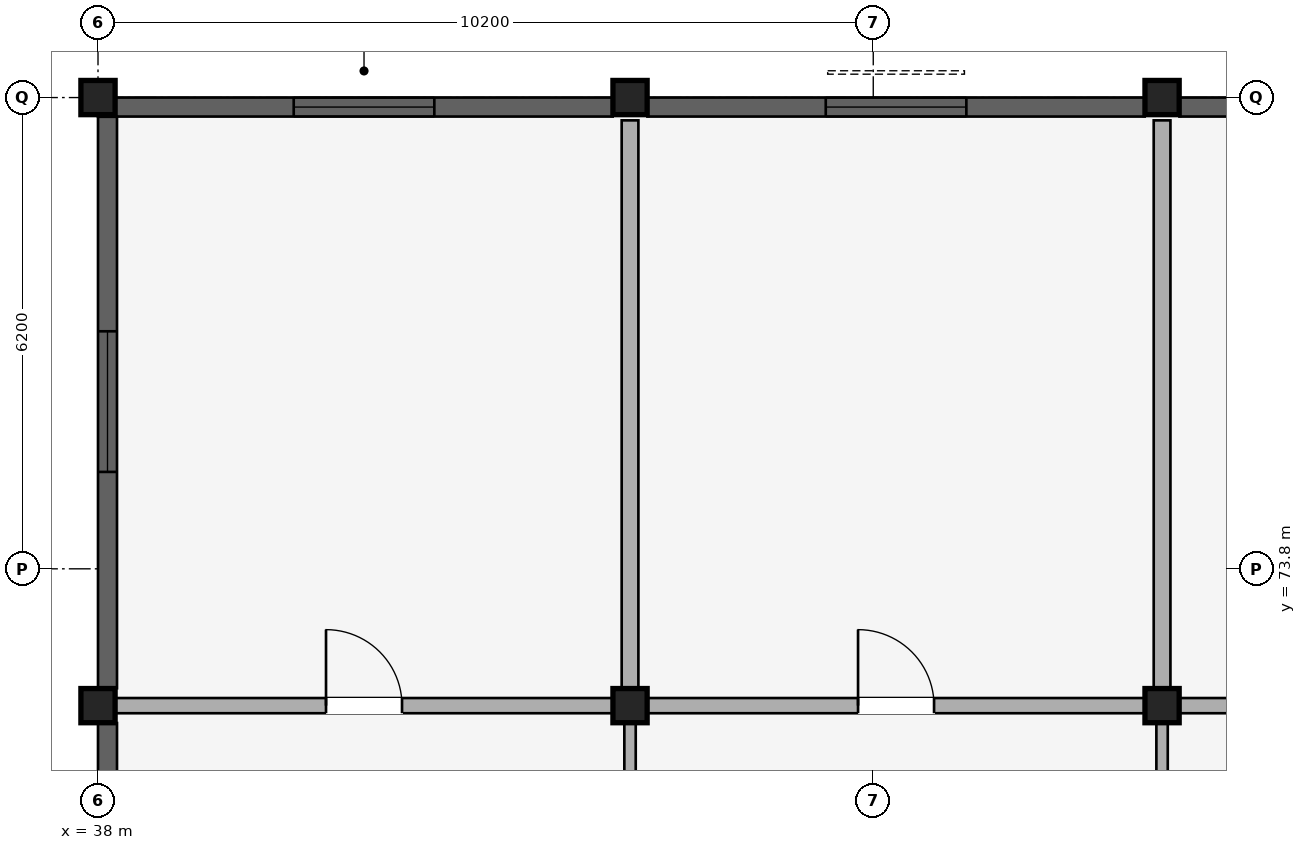
"""IFC4 building model, lengths in metres.
Left out: names, types, materials, properties, quantities, classifications, styles, units other than length and angle.
Written with IfcOpenShell. Run it as: python <this file> out.ifc"""

import sys

from ifc_helpers import new_model, si_unit, direction, frame, frame_2d, origin, origin_2d, place, context, subcontext, project, spatial, rectangle, extrude, element, fill, save


model = new_model("IFC4")
c1 = context("Model", 3, precision=1e-05, world=origin(), true_north=direction((0.0, 1.0)))
c2 = subcontext(c1, "Body", "Model", "MODEL_VIEW")
j1 = project(units=[si_unit("LENGTHUNIT", "METRE"), si_unit("PLANEANGLEUNIT", "RADIAN")], contexts=[c1])
p1 = place(None, origin())
s1 = spatial("IfcSite", under=j1, at=p1, CompositionType="ELEMENT")
p2 = place(p1, origin())
s2 = spatial("IfcBuilding", under=s1, at=p2, CompositionType="ELEMENT")
p3 = place(p2, frame((0.0, 0.0, 4.5)))
s3 = spatial("IfcBuildingStorey", under=s2, at=p3, CompositionType="ELEMENT", Elevation=4.5)
p4 = place(p3, frame((38.0, 72.0, 0.0), z_axis=(0.0, 0.0, 1.0), x_axis=(1.0, 0.0, 0.0)))
e1 = element("IfcColumn", 1, at=p4, inside=s3, PredefinedType="COLUMN", context=c2, shape_type="SweptSolid", body=[
    extrude(rectangle(XDim=0.45, YDim=0.45, at=origin_2d()), origin(), (0.0, 0.0, 1.0), 4.0),
])
p5 = place(p3, frame((38.0, 80.0, 0.0), z_axis=(0.0, 0.0, 1.0), x_axis=(1.0, 0.0, 0.0)))
e2 = element("IfcColumn", 2, at=p5, inside=s3, PredefinedType="COLUMN", context=c2, shape_type="SweptSolid", body=[
    extrude(rectangle(XDim=0.45, YDim=0.45, at=origin_2d()), origin(), (0.0, 0.0, 1.0), 4.85),
])
p6 = place(p3, frame((45.0, 72.0, 0.0), z_axis=(0.0, 0.0, 1.0), x_axis=(1.0, 0.0, 0.0)))
e3 = element("IfcColumn", 3, at=p6, inside=s3, PredefinedType="COLUMN", context=c2, shape_type="SweptSolid", body=[
    extrude(rectangle(XDim=0.45, YDim=0.45, at=origin_2d()), origin(), (0.0, 0.0, 1.0), 4.0),
])
p7 = place(p3, frame((45.0, 80.0, 0.0), z_axis=(0.0, 0.0, 1.0), x_axis=(1.0, 0.0, 0.0)))
e4 = element("IfcColumn", 4, at=p7, inside=s3, PredefinedType="COLUMN", context=c2, shape_type="SweptSolid", body=[
    extrude(rectangle(XDim=0.45, YDim=0.45, at=origin_2d()), origin(), (0.0, 0.0, 1.0), 4.85),
])
p8 = place(p3, frame((52.0, 72.0, 0.0), z_axis=(0.0, 0.0, 1.0), x_axis=(1.0, 0.0, 0.0)))
e5 = element("IfcColumn", 5, at=p8, inside=s3, PredefinedType="COLUMN", context=c2, shape_type="SweptSolid", body=[
    extrude(rectangle(XDim=0.45, YDim=0.45, at=origin_2d()), origin(), (0.0, 0.0, 1.0), 4.0),
])
p9 = place(p3, frame((52.0, 80.0, 0.0), z_axis=(0.0, 0.0, 1.0), x_axis=(1.0, 0.0, 0.0)))
e6 = element("IfcColumn", 6, at=p9, inside=s3, PredefinedType="COLUMN", context=c2, shape_type="SweptSolid", body=[
    extrude(rectangle(XDim=0.45, YDim=0.45, at=origin_2d()), origin(), (0.0, 0.0, 1.0), 4.85),
])
p10 = place(p3, frame((38.15, 72.0, 0.0), z_axis=(0.0, 0.0, 1.0), x_axis=(1.0, 0.0, 0.0)))
e7 = element("IfcWall", 7, at=p10, inside=s3, PredefinedType="STANDARD", context=c2, shape_type="SweptSolid", body=[
    extrude(rectangle(XDim=6.7, YDim=0.2, at=frame_2d((3.35, 0.0))), origin(), (0.0, 0.0, 1.0), 2.792),
])
p11 = place(p10, frame((2.85, 0.0, 0.0)))
e8 = element("IfcOpeningElement", 8, at=p11, cuts=e7, PredefinedType="OPENING", context=c2, shape_type="SweptSolid", body=[
    extrude(rectangle(XDim=1.0, YDim=2.15, at=frame_2d((0.5, 1.075))), frame((0.0, 0.11, 0.0), z_axis=(0.0, -1.0, 0.0), x_axis=(1.0, 0.0, 0.0)), (0.0, 0.0, 1.0), 0.22),
])
p12 = place(p3, frame((45.15, 72.0, 0.0), z_axis=(0.0, 0.0, 1.0), x_axis=(1.0, 0.0, 0.0)))
e9 = element("IfcWall", 9, at=p12, inside=s3, PredefinedType="STANDARD", context=c2, shape_type="SweptSolid", body=[
    extrude(rectangle(XDim=6.7, YDim=0.2, at=frame_2d((3.35, 0.0))), origin(), (0.0, 0.0, 1.0), 2.792),
])
p13 = place(p12, frame((2.85, 0.0, 0.0)))
e10 = element("IfcOpeningElement", 10, at=p13, cuts=e9, PredefinedType="OPENING", context=c2, shape_type="SweptSolid", body=[
    extrude(rectangle(XDim=1.0, YDim=2.15, at=frame_2d((0.5, 1.075))), frame((0.0, 0.11, 0.0), z_axis=(0.0, -1.0, 0.0), x_axis=(1.0, 0.0, 0.0)), (0.0, 0.0, 1.0), 0.22),
])
p14 = place(p3, frame((52.15, 72.0, 0.0), z_axis=(0.0, 0.0, 1.0), x_axis=(1.0, 0.0, 0.0)))
e11 = element("IfcWall", 11, at=p14, inside=s3, PredefinedType="STANDARD", context=c2, shape_type="SweptSolid", body=[
    extrude(rectangle(XDim=6.7, YDim=0.2, at=frame_2d((3.35, 0.0))), origin(), (0.0, 0.0, 1.0), 2.792),
])
p15 = place(p14, frame((2.85, 0.0, 0.0)))
e12 = element("IfcOpeningElement", 12, at=p15, cuts=e11, PredefinedType="OPENING", context=c2, shape_type="SweptSolid", body=[
    extrude(rectangle(XDim=1.0, YDim=2.15, at=frame_2d((0.5, 1.075))), frame((0.0, 0.11, 0.0), z_axis=(0.0, -1.0, 0.0), x_axis=(1.0, 0.0, 0.0)), (0.0, 0.0, 1.0), 0.22),
])
p16 = place(p3, frame((45.0, 64.1, 0.0), z_axis=(0.0, 0.0, 1.0), x_axis=(0.0, 1.0, 0.0)))
e13 = element("IfcWall", 13, at=p16, inside=s3, PredefinedType="PARTITIONING", context=c2, shape_type="SweptSolid", body=[
    extrude(rectangle(XDim=7.8, YDim=0.15, at=frame_2d((3.9, 0.0))), origin(), (0.0, 0.0, 1.0), 2.792),
])
p17 = place(p16, frame((3.0, 0.0, 0.0)))
e14 = element("IfcOpeningElement", 14, at=p17, cuts=e13, PredefinedType="OPENING", context=c2, shape_type="SweptSolid", body=[
    extrude(rectangle(XDim=1.8, YDim=2.2, at=frame_2d((0.9, 1.1))), frame((0.0, 0.085, 0.0), z_axis=(0.0, -1.0, 0.0), x_axis=(1.0, 0.0, 0.0)), (0.0, 0.0, 1.0), 0.17),
])
p18 = place(p3, frame((45.0, 72.1, 0.0), z_axis=(0.0, 0.0, 1.0), x_axis=(0.0, 1.0, 0.0)))
e15 = element("IfcWall", 15, at=p18, inside=s3, PredefinedType="STANDARD", context=c2, shape_type="SweptSolid", body=[
    extrude(rectangle(XDim=7.6, YDim=0.22, at=frame_2d((3.8, 0.0))), origin(), (0.0, 0.0, 1.0), 3.442),
])
p19 = place(p3, frame((52.0, 64.1, 0.0), z_axis=(0.0, 0.0, 1.0), x_axis=(0.0, 1.0, 0.0)))
e16 = element("IfcWall", 16, at=p19, inside=s3, PredefinedType="PARTITIONING", context=c2, shape_type="SweptSolid", body=[
    extrude(rectangle(XDim=7.8, YDim=0.15, at=frame_2d((3.9, 0.0))), origin(), (0.0, 0.0, 1.0), 2.792),
])
p20 = place(p19, frame((3.0, 0.0, 0.0)))
e17 = element("IfcOpeningElement", 17, at=p20, cuts=e16, PredefinedType="OPENING", context=c2, shape_type="SweptSolid", body=[
    extrude(rectangle(XDim=1.8, YDim=2.2, at=frame_2d((0.9, 1.1))), frame((0.0, 0.085, 0.0), z_axis=(0.0, -1.0, 0.0), x_axis=(1.0, 0.0, 0.0)), (0.0, 0.0, 1.0), 0.17),
])
p21 = place(p3, frame((52.0, 72.1, 0.0), z_axis=(0.0, 0.0, 1.0), x_axis=(0.0, 1.0, 0.0)))
e18 = element("IfcWall", 18, at=p21, inside=s3, PredefinedType="STANDARD", context=c2, shape_type="SweptSolid", body=[
    extrude(rectangle(XDim=7.6, YDim=0.22, at=frame_2d((3.8, 0.0))), origin(), (0.0, 0.0, 1.0), 3.442),
])
p22 = place(p3, frame((38.0, 79.875, 0.0), z_axis=(0.0, 0.0, 1.0), x_axis=(1.0, 0.0, 0.0)))
e19 = element("IfcWall", 19, at=p22, inside=s3, PredefinedType="STANDARD", context=c2, shape_type="SweptSolid", body=[
    extrude(rectangle(XDim=6.771, YDim=0.25, at=frame_2d((3.386, 0.0))), origin(), (0.0, 0.0, 1.0), 3.442),
])
p23 = place(p22, frame((2.575, 0.0, 0.88)))
e20 = element("IfcOpeningElement", 20, at=p23, cuts=e19, PredefinedType="OPENING", context=c2, shape_type="SweptSolid", body=[
    extrude(rectangle(XDim=1.85, YDim=1.9, at=frame_2d((0.925, 0.95))), frame((0.0, 0.135, 0.0), z_axis=(0.0, -1.0, 0.0), x_axis=(1.0, 0.0, 0.0)), (0.0, 0.0, 1.0), 0.27),
])
p24 = place(p3, frame((45.229, 79.875, 0.0), z_axis=(0.0, 0.0, 1.0), x_axis=(1.0, 0.0, 0.0)))
e21 = element("IfcWall", 21, at=p24, inside=s3, PredefinedType="STANDARD", context=c2, shape_type="SweptSolid", body=[
    extrude(rectangle(XDim=6.543, YDim=0.25, at=frame_2d((3.271, 0.0))), origin(), (0.0, 0.0, 1.0), 3.442),
])
p25 = place(p24, frame((2.346, 0.0, 0.88)))
e22 = element("IfcOpeningElement", 22, at=p25, cuts=e21, PredefinedType="OPENING", context=c2, shape_type="SweptSolid", body=[
    extrude(rectangle(XDim=1.85, YDim=1.9, at=frame_2d((0.925, 0.95))), frame((0.0, 0.135, 0.0), z_axis=(0.0, -1.0, 0.0), x_axis=(1.0, 0.0, 0.0)), (0.0, 0.0, 1.0), 0.27),
])
p26 = place(p3, frame((52.229, 79.875, 0.0), z_axis=(0.0, 0.0, 1.0), x_axis=(1.0, 0.0, 0.0)))
e23 = element("IfcWall", 23, at=p26, inside=s3, PredefinedType="STANDARD", context=c2, shape_type="SweptSolid", body=[
    extrude(rectangle(XDim=6.543, YDim=0.25, at=frame_2d((3.271, 0.0))), origin(), (0.0, 0.0, 1.0), 3.442),
])
p27 = place(p26, frame((2.346, 0.0, 0.88)))
e24 = element("IfcOpeningElement", 24, at=p27, cuts=e23, PredefinedType="OPENING", context=c2, shape_type="SweptSolid", body=[
    extrude(rectangle(XDim=1.85, YDim=1.9, at=frame_2d((0.925, 0.95))), frame((0.0, 0.135, 0.0), z_axis=(0.0, -1.0, 0.0), x_axis=(1.0, 0.0, 0.0)), (0.0, 0.0, 1.0), 0.27),
])
p28 = place(p3, frame((38.125, 64.229, 0.0), z_axis=(0.0, 0.0, 1.0), x_axis=(0.0, 1.0, 0.0)))
e25 = element("IfcWall", 25, at=p28, inside=s3, PredefinedType="STANDARD", context=c2, shape_type="SweptSolid", body=[
    extrude(rectangle(XDim=7.543, YDim=0.25, at=frame_2d((3.771, 0.0))), origin(), (0.0, 0.0, 1.0), 2.792),
])
p29 = place(p28, frame((2.846, 0.0, 0.692)))
e26 = element("IfcOpeningElement", 26, at=p29, cuts=e25, PredefinedType="OPENING", context=c2, shape_type="SweptSolid", body=[
    extrude(rectangle(XDim=1.85, YDim=1.9, at=frame_2d((0.925, 0.95))), frame((0.0, 0.135, 0.0), z_axis=(0.0, -1.0, 0.0), x_axis=(1.0, 0.0, 0.0)), (0.0, 0.0, 1.0), 0.27),
])
p30 = place(p3, frame((38.125, 72.229, 0.0), z_axis=(0.0, 0.0, 1.0), x_axis=(0.0, 1.0, 0.0)))
e27 = element("IfcWall", 27, at=p30, inside=s3, PredefinedType="STANDARD", context=c2, shape_type="SweptSolid", body=[
    extrude(rectangle(XDim=7.519, YDim=0.25, at=frame_2d((3.759, 0.0))), origin(), (0.0, 0.0, 1.0), 3.442),
])
p31 = place(p30, frame((2.846, 0.0, 0.88)))
e28 = element("IfcOpeningElement", 28, at=p31, cuts=e27, PredefinedType="OPENING", context=c2, shape_type="SweptSolid", body=[
    extrude(rectangle(XDim=1.85, YDim=1.9, at=frame_2d((0.925, 0.95))), frame((0.0, 0.135, 0.0), z_axis=(0.0, -1.0, 0.0), x_axis=(1.0, 0.0, 0.0)), (0.0, 0.0, 1.0), 0.27),
])
p32 = place(p23, origin())
e29 = element("IfcWindow", 29, at=p32, inside=s3, PartitioningType="DOUBLE_PANEL_VERTICAL", PredefinedType="WINDOW", context=c2, shape_type="SweptSolid", body=[
    extrude(rectangle(XDim=1.85, YDim=1.9, at=frame_2d((0.925, 0.95))), frame((0.0, 0.03, 0.0), z_axis=(0.0, -1.0, 0.0), x_axis=(1.0, 0.0, 0.0)), (0.0, 0.0, 1.0), 0.06),
])
fill(e20, e29)
p33 = place(p25, origin())
e30 = element("IfcWindow", 30, at=p33, inside=s3, PartitioningType="DOUBLE_PANEL_VERTICAL", PredefinedType="WINDOW", context=c2, shape_type="SweptSolid", body=[
    extrude(rectangle(XDim=1.85, YDim=1.9, at=frame_2d((0.925, 0.95))), frame((0.0, 0.03, 0.0), z_axis=(0.0, -1.0, 0.0), x_axis=(1.0, 0.0, 0.0)), (0.0, 0.0, 1.0), 0.06),
])
fill(e22, e30)
p34 = place(p31, origin())
e31 = element("IfcWindow", 31, at=p34, inside=s3, PartitioningType="DOUBLE_PANEL_VERTICAL", PredefinedType="WINDOW", context=c2, shape_type="SweptSolid", body=[
    extrude(rectangle(XDim=1.85, YDim=1.9, at=frame_2d((0.925, 0.95))), frame((0.0, 0.03, 0.0), z_axis=(0.0, -1.0, 0.0), x_axis=(1.0, 0.0, 0.0)), (0.0, 0.0, 1.0), 0.06),
])
fill(e28, e31)
p35 = place(p11, origin())
e32 = element("IfcDoor", 32, at=p35, inside=s3, OperationType="SINGLE_SWING_LEFT", PredefinedType="DOOR", context=c2, shape_type="SweptSolid", body=[
    extrude(rectangle(XDim=1.0, YDim=2.15, at=frame_2d((0.5, 1.075))), frame((0.0, 0.025, 0.0), z_axis=(0.0, -1.0, 0.0), x_axis=(1.0, 0.0, 0.0)), (0.0, 0.0, 1.0), 0.05),
])
fill(e8, e32)
p36 = place(p13, frame((1.0, 0.0, 0.0), z_axis=(0.0, 0.0, 1.0), x_axis=(-1.0, 0.0, 0.0)))
e33 = element("IfcDoor", 33, at=p36, inside=s3, OperationType="SINGLE_SWING_RIGHT", PredefinedType="DOOR", context=c2, shape_type="SweptSolid", body=[
    extrude(rectangle(XDim=1.0, YDim=2.15, at=frame_2d((0.5, 1.075))), frame((0.0, 0.025, 0.0), z_axis=(0.0, -1.0, 0.0), x_axis=(1.0, 0.0, 0.0)), (0.0, 0.0, 1.0), 0.05),
])
fill(e10, e33)
save(model, sys.argv[1])
